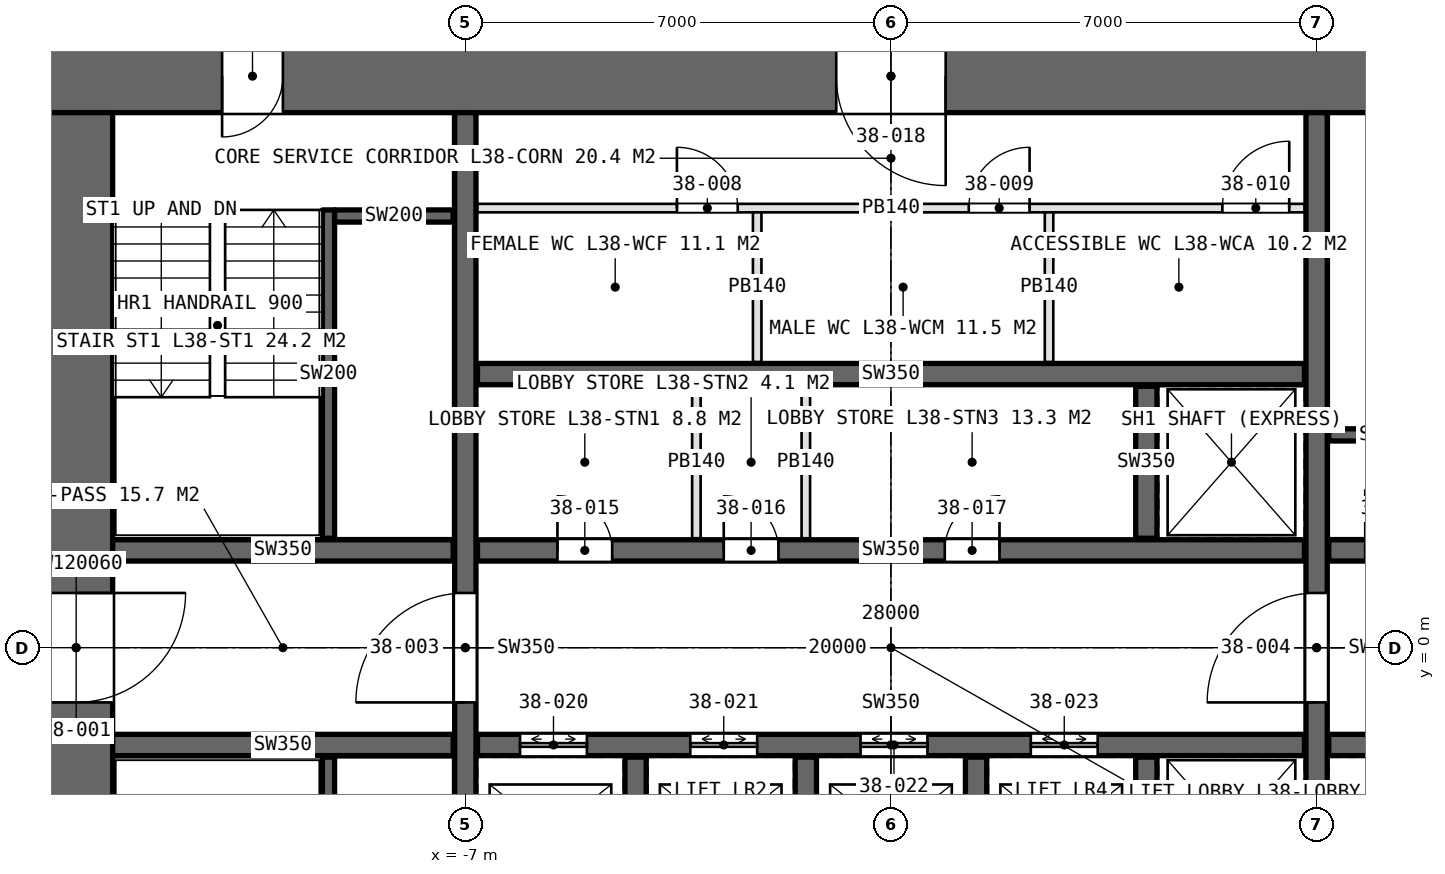
"""IFC4 building model, lengths in metres.
Left out: names, types, materials, properties, quantities, classifications, styles, units other than length and angle.
Written with IfcOpenShell. Run it as: python <this file> out.ifc"""

import sys

from ifc_helpers import new_model, si_unit, direction, frame, frame_2d, origin, place, context, subcontext, project, spatial, rectangle, extrude, element, fill, save


model = new_model("IFC4")
c1 = context("Model", 3, precision=1e-05, world=origin(), true_north=direction((0.0, 1.0)))
c2 = subcontext(c1, "Body", "Model", "MODEL_VIEW")
j1 = project(units=[si_unit("LENGTHUNIT", "METRE"), si_unit("PLANEANGLEUNIT", "RADIAN")], contexts=[c1])
p1 = place(None, origin())
s1 = spatial("IfcSite", under=j1, at=p1, CompositionType="ELEMENT")
p2 = place(p1, origin())
s2 = spatial("IfcBuilding", under=s1, at=p2, CompositionType="ELEMENT")
p3 = place(p2, frame((0.0, 0.0, 176.4)))
s3 = spatial("IfcBuildingStorey", under=s2, at=p3, CompositionType="ELEMENT", Elevation=176.4)
p4 = place(p3, frame((14.0, 9.4, 0.0), z_axis=(0.0, 0.0, 1.0), x_axis=(-1.0, 0.0, 0.0)))
e1 = element("IfcWall", 1, at=p4, inside=s3, PredefinedType="SHEAR", context=c2, shape_type="SweptSolid", body=[
    extrude(rectangle(XDim=28.0, YDim=1.2, at=frame_2d((14.0, 0.0))), origin(), (0.0, 0.0, 1.0), 4.2),
])
p5 = place(p4, frame((24.0, 0.0, 0.0)))
e2 = element("IfcOpeningElement", 2, at=p5, cuts=e1, PredefinedType="OPENING", context=c2, shape_type="SweptSolid", body=[
    extrude(rectangle(XDim=1.0, YDim=2.4, at=frame_2d((0.5, 1.2))), frame((0.0, 0.61, 0.0), z_axis=(0.0, -1.0, 0.0), x_axis=(1.0, 0.0, 0.0)), (0.0, 0.0, 1.0), 1.22),
])
p6 = place(p4, frame((13.1, 0.0, 0.0)))
e3 = element("IfcOpeningElement", 3, at=p6, cuts=e1, PredefinedType="OPENING", context=c2, shape_type="SweptSolid", body=[
    extrude(rectangle(XDim=1.8, YDim=2.4, at=frame_2d((0.9, 1.2))), frame((0.0, 0.61, 0.0), z_axis=(0.0, -1.0, 0.0), x_axis=(1.0, 0.0, 0.0)), (0.0, 0.0, 1.0), 1.22),
])
p7 = place(p3, frame((-13.4, 8.8, 0.0), z_axis=(0.0, 0.0, 1.0), x_axis=(0.0, -1.0, 0.0)))
e4 = element("IfcWall", 4, at=p7, inside=s3, PredefinedType="SHEAR", context=c2, shape_type="SweptSolid", body=[
    extrude(rectangle(XDim=17.6, YDim=1.2, at=frame_2d((8.8, 0.0))), origin(), (0.0, 0.0, 1.0), 4.2),
])
p8 = place(p7, frame((7.9, 0.0, 0.0)))
e5 = element("IfcOpeningElement", 5, at=p8, cuts=e4, PredefinedType="OPENING", context=c2, shape_type="SweptSolid", body=[
    extrude(rectangle(XDim=1.8, YDim=2.4, at=frame_2d((0.9, 1.2))), frame((0.0, 0.61, 0.0), z_axis=(0.0, -1.0, 0.0), x_axis=(1.0, 0.0, 0.0)), (0.0, 0.0, 1.0), 1.22),
])
p9 = place(p7, frame((16.5, 0.0, 0.0)))
e6 = element("IfcOpeningElement", 6, at=p9, cuts=e4, PredefinedType="OPENING", context=c2, shape_type="SweptSolid", body=[
    extrude(rectangle(XDim=1.0, YDim=2.4, at=frame_2d((0.5, 1.2))), frame((0.0, 0.61, 0.0), z_axis=(0.0, -1.0, 0.0), x_axis=(1.0, 0.0, 0.0)), (0.0, 0.0, 1.0), 1.22),
])
p10 = place(p3, frame((-7.0, -8.8, 0.0), z_axis=(0.0, 0.0, 1.0), x_axis=(0.0, 1.0, 0.0)))
e7 = element("IfcWall", 7, at=p10, inside=s3, PredefinedType="SHEAR", context=c2, shape_type="SweptSolid", body=[
    extrude(rectangle(XDim=17.6, YDim=0.35, at=frame_2d((8.8, 0.0))), origin(), (0.0, 0.0, 1.0), 4.2),
])
p11 = place(p10, frame((7.9, 0.0, 0.0)))
e8 = element("IfcOpeningElement", 8, at=p11, cuts=e7, PredefinedType="OPENING", context=c2, shape_type="SweptSolid", body=[
    extrude(rectangle(XDim=1.8, YDim=2.4, at=frame_2d((0.9, 1.2))), frame((0.0, 0.185, 0.0), z_axis=(0.0, -1.0, 0.0), x_axis=(1.0, 0.0, 0.0)), (0.0, 0.0, 1.0), 0.37),
])
p12 = place(p3, frame((7.0, -8.8, 0.0), z_axis=(0.0, 0.0, 1.0), x_axis=(0.0, 1.0, 0.0)))
e9 = element("IfcWall", 9, at=p12, inside=s3, PredefinedType="SHEAR", context=c2, shape_type="SweptSolid", body=[
    extrude(rectangle(XDim=17.6, YDim=0.35, at=frame_2d((8.8, 0.0))), origin(), (0.0, 0.0, 1.0), 4.2),
])
p13 = place(p12, frame((7.9, 0.0, 0.0)))
e10 = element("IfcOpeningElement", 10, at=p13, cuts=e9, PredefinedType="OPENING", context=c2, shape_type="SweptSolid", body=[
    extrude(rectangle(XDim=1.8, YDim=2.4, at=frame_2d((0.9, 1.2))), frame((0.0, 0.185, 0.0), z_axis=(0.0, -1.0, 0.0), x_axis=(1.0, 0.0, 0.0)), (0.0, 0.0, 1.0), 0.37),
])
p14 = place(p3, frame((-6.8, 1.6, 0.0), z_axis=(0.0, 0.0, 1.0), x_axis=(1.0, 0.0, 0.0)))
e11 = element("IfcWall", 11, at=p14, inside=s3, PredefinedType="SHEAR", context=c2, shape_type="SweptSolid", body=[
    extrude(rectangle(XDim=13.6, YDim=0.35, at=frame_2d((6.8, 0.0))), origin(), (0.0, 0.0, 1.0), 4.2),
])
p15 = place(p14, frame((1.315, 0.0, 0.0)))
e12 = element("IfcOpeningElement", 12, at=p15, cuts=e11, PredefinedType="OPENING", context=c2, shape_type="SweptSolid", body=[
    extrude(rectangle(XDim=0.9, YDim=2.4, at=frame_2d((0.45, 1.2))), frame((0.0, 0.185, 0.0), z_axis=(0.0, -1.0, 0.0), x_axis=(1.0, 0.0, 0.0)), (0.0, 0.0, 1.0), 0.37),
])
p16 = place(p14, frame((4.05, 0.0, 0.0)))
e13 = element("IfcOpeningElement", 13, at=p16, cuts=e11, PredefinedType="OPENING", context=c2, shape_type="SweptSolid", body=[
    extrude(rectangle(XDim=0.9, YDim=2.4, at=frame_2d((0.45, 1.2))), frame((0.0, 0.185, 0.0), z_axis=(0.0, -1.0, 0.0), x_axis=(1.0, 0.0, 0.0)), (0.0, 0.0, 1.0), 0.37),
])
p17 = place(p14, frame((7.685, 0.0, 0.0)))
e14 = element("IfcOpeningElement", 14, at=p17, cuts=e11, PredefinedType="OPENING", context=c2, shape_type="SweptSolid", body=[
    extrude(rectangle(XDim=0.9, YDim=2.4, at=frame_2d((0.45, 1.2))), frame((0.0, 0.185, 0.0), z_axis=(0.0, -1.0, 0.0), x_axis=(1.0, 0.0, 0.0)), (0.0, 0.0, 1.0), 0.37),
])
p18 = place(p3, frame((-6.8, -1.6, 0.0), z_axis=(0.0, 0.0, 1.0), x_axis=(1.0, 0.0, 0.0)))
e15 = element("IfcWall", 15, at=p18, inside=s3, PredefinedType="SHEAR", context=c2, shape_type="SweptSolid", body=[
    extrude(rectangle(XDim=13.6, YDim=0.35, at=frame_2d((6.8, 0.0))), origin(), (0.0, 0.0, 1.0), 4.2),
])
p19 = place(p18, frame((0.7, 0.0, 0.0)))
e16 = element("IfcOpeningElement", 16, at=p19, cuts=e15, PredefinedType="OPENING", context=c2, shape_type="SweptSolid", body=[
    extrude(rectangle(XDim=1.1, YDim=2.4, at=frame_2d((0.55, 1.2))), frame((0.0, 0.185, 0.0), z_axis=(0.0, -1.0, 0.0), x_axis=(1.0, 0.0, 0.0)), (0.0, 0.0, 1.0), 0.37),
])
p20 = place(p18, frame((3.5, 0.0, 0.0)))
e17 = element("IfcOpeningElement", 17, at=p20, cuts=e15, PredefinedType="OPENING", context=c2, shape_type="SweptSolid", body=[
    extrude(rectangle(XDim=1.1, YDim=2.4, at=frame_2d((0.55, 1.2))), frame((0.0, 0.185, 0.0), z_axis=(0.0, -1.0, 0.0), x_axis=(1.0, 0.0, 0.0)), (0.0, 0.0, 1.0), 0.37),
])
p21 = place(p18, frame((6.3, 0.0, 0.0)))
e18 = element("IfcOpeningElement", 18, at=p21, cuts=e15, PredefinedType="OPENING", context=c2, shape_type="SweptSolid", body=[
    extrude(rectangle(XDim=1.1, YDim=2.4, at=frame_2d((0.55, 1.2))), frame((0.0, 0.185, 0.0), z_axis=(0.0, -1.0, 0.0), x_axis=(1.0, 0.0, 0.0)), (0.0, 0.0, 1.0), 0.37),
])
p22 = place(p18, frame((9.1, 0.0, 0.0)))
e19 = element("IfcOpeningElement", 19, at=p22, cuts=e15, PredefinedType="OPENING", context=c2, shape_type="SweptSolid", body=[
    extrude(rectangle(XDim=1.1, YDim=2.4, at=frame_2d((0.55, 1.2))), frame((0.0, 0.185, 0.0), z_axis=(0.0, -1.0, 0.0), x_axis=(1.0, 0.0, 0.0)), (0.0, 0.0, 1.0), 0.37),
])
p23 = place(p3, frame((-6.8, 4.5, 0.0), z_axis=(0.0, 0.0, 1.0), x_axis=(1.0, 0.0, 0.0)))
e20 = element("IfcWall", 20, at=p23, inside=s3, PredefinedType="SHEAR", context=c2, shape_type="SweptSolid", body=[
    extrude(rectangle(XDim=13.6, YDim=0.35, at=frame_2d((6.8, 0.0))), origin(), (0.0, 0.0, 1.0), 4.2),
])
for number, where, z_axis, x_axis in (
    (21, (-12.8, 1.6, 0.0), (0.0, 0.0, 1.0), (1.0, 0.0, 0.0)),
    (22, (-12.8, -1.6, 0.0), (0.0, 0.0, 1.0), (1.0, 0.0, 0.0)),
):
    element("IfcWall", number, at=place(p3, frame(where, z_axis=z_axis, x_axis=x_axis)), inside=s3, PredefinedType="SHEAR", context=c2, shape_type="SweptSolid", body=[
        extrude(rectangle(XDim=5.6, YDim=0.35, at=frame_2d((2.8, 0.0))), origin(), (0.0, 0.0, 1.0), 4.2),
    ])
p24 = place(p3, frame((7.2, 1.6, 0.0), z_axis=(0.0, 0.0, 1.0), x_axis=(1.0, 0.0, 0.0)))
e23 = element("IfcWall", 23, at=p24, inside=s3, PredefinedType="SHEAR", context=c2, shape_type="SweptSolid", body=[
    extrude(rectangle(XDim=5.6, YDim=0.35, at=frame_2d((2.8, 0.0))), origin(), (0.0, 0.0, 1.0), 4.2),
])
p25 = place(p24, frame((0.6, 0.0, 0.0)))
e24 = element("IfcOpeningElement", 24, at=p25, cuts=e23, PredefinedType="OPENING", context=c2, shape_type="SweptSolid", body=[
    extrude(rectangle(XDim=1.0, YDim=2.4, at=frame_2d((0.5, 1.2))), frame((0.0, 0.185, 0.0), z_axis=(0.0, -1.0, 0.0), x_axis=(1.0, 0.0, 0.0)), (0.0, 0.0, 1.0), 0.37),
])
p26 = place(p3, frame((7.2, -1.6, 0.0), z_axis=(0.0, 0.0, 1.0), x_axis=(1.0, 0.0, 0.0)))
e25 = element("IfcWall", 25, at=p26, inside=s3, PredefinedType="SHEAR", context=c2, shape_type="SweptSolid", body=[
    extrude(rectangle(XDim=5.6, YDim=0.35, at=frame_2d((2.8, 0.0))), origin(), (0.0, 0.0, 1.0), 4.2),
])
p27 = place(p26, frame((0.9, 0.0, 0.0)))
e26 = element("IfcOpeningElement", 26, at=p27, cuts=e25, PredefinedType="OPENING", context=c2, shape_type="SweptSolid", body=[
    extrude(rectangle(XDim=1.3, YDim=2.4, at=frame_2d((0.65, 1.2))), frame((0.0, 0.185, 0.0), z_axis=(0.0, -1.0, 0.0), x_axis=(1.0, 0.0, 0.0)), (0.0, 0.0, 1.0), 0.37),
])
p28 = place(p26, frame((3.9, 0.0, 0.0)))
e27 = element("IfcOpeningElement", 27, at=p28, cuts=e25, PredefinedType="OPENING", context=c2, shape_type="SweptSolid", body=[
    extrude(rectangle(XDim=1.3, YDim=2.4, at=frame_2d((0.65, 1.2))), frame((0.0, 0.185, 0.0), z_axis=(0.0, -1.0, 0.0), x_axis=(1.0, 0.0, 0.0)), (0.0, 0.0, 1.0), 0.37),
])
for number, where, z_axis, x_axis in (
    (28, (-4.2, -4.3, 0.0), (0.0, 0.0, 1.0), (0.0, 1.0, 0.0)),
    (29, (-1.4, -4.3, 0.0), (0.0, 0.0, 1.0), (0.0, 1.0, 0.0)),
    (30, (1.4, -4.3, 0.0), (0.0, 0.0, 1.0), (0.0, 1.0, 0.0)),
    (31, (4.2, 1.8, 0.0), (0.0, 0.0, 1.0), (0.0, 1.0, 0.0)),
    (32, (4.2, -4.3, 0.0), (0.0, 0.0, 1.0), (0.0, 1.0, 0.0)),
):
    element("IfcWall", number, at=place(p3, frame(where, z_axis=z_axis, x_axis=x_axis)), inside=s3, PredefinedType="SHEAR", context=c2, shape_type="SweptSolid", body=[
        extrude(rectangle(XDim=2.5, YDim=0.35, at=frame_2d((1.25, 0.0))), origin(), (0.0, 0.0, 1.0), 4.2),
    ])
p29 = place(p3, frame((-6.8, 7.23, 0.0), z_axis=(0.0, 0.0, 1.0), x_axis=(1.0, 0.0, 0.0)))
e33 = element("IfcWall", 33, at=p29, inside=s3, PredefinedType="PARTITIONING", context=c2, shape_type="SweptSolid", body=[
    extrude(rectangle(XDim=13.6, YDim=0.14, at=frame_2d((6.8, 0.0))), origin(), (0.0, 0.0, 1.0), 3.95),
])
p30 = place(p29, frame((3.28, 0.0, 0.0)))
e34 = element("IfcOpeningElement", 34, at=p30, cuts=e33, PredefinedType="OPENING", context=c2, shape_type="SweptSolid", body=[
    extrude(rectangle(XDim=1.0, YDim=2.4, at=frame_2d((0.5, 1.2))), frame((0.0, 0.08, 0.0), z_axis=(0.0, -1.0, 0.0), x_axis=(1.0, 0.0, 0.0)), (0.0, 0.0, 1.0), 0.16),
])
p31 = place(p29, frame((8.08, 0.0, 0.0)))
e35 = element("IfcOpeningElement", 35, at=p31, cuts=e33, PredefinedType="OPENING", context=c2, shape_type="SweptSolid", body=[
    extrude(rectangle(XDim=1.0, YDim=2.4, at=frame_2d((0.5, 1.2))), frame((0.0, 0.08, 0.0), z_axis=(0.0, -1.0, 0.0), x_axis=(1.0, 0.0, 0.0)), (0.0, 0.0, 1.0), 0.16),
])
p32 = place(p29, frame((12.25, 0.0, 0.0)))
e36 = element("IfcOpeningElement", 36, at=p32, cuts=e33, PredefinedType="OPENING", context=c2, shape_type="SweptSolid", body=[
    extrude(rectangle(XDim=1.1, YDim=2.4, at=frame_2d((0.55, 1.2))), frame((0.0, 0.08, 0.0), z_axis=(0.0, -1.0, 0.0), x_axis=(1.0, 0.0, 0.0)), (0.0, 0.0, 1.0), 0.16),
])
for number, where, z_axis, x_axis in (
    (37, (-2.2, 4.7, 0.0), (0.0, 0.0, 1.0), (0.0, 1.0, 0.0)),
    (38, (2.6, 4.7, 0.0), (0.0, 0.0, 1.0), (0.0, 1.0, 0.0)),
):
    element("IfcWall", number, at=place(p3, frame(where, z_axis=z_axis, x_axis=x_axis)), inside=s3, PredefinedType="PARTITIONING", context=c2, shape_type="SweptSolid", body=[
        extrude(rectangle(XDim=2.46, YDim=0.14, at=frame_2d((1.23, 0.0))), origin(), (0.0, 0.0, 1.0), 3.95),
    ])
for number, where, z_axis, x_axis in (
    (39, (-3.2, 1.8, 0.0), (0.0, 0.0, 1.0), (0.0, 1.0, 0.0)),
    (40, (-1.4, 1.8, 0.0), (0.0, 0.0, 1.0), (0.0, 1.0, 0.0)),
):
    element("IfcWall", number, at=place(p3, frame(where, z_axis=z_axis, x_axis=x_axis)), inside=s3, PredefinedType="PARTITIONING", context=c2, shape_type="SweptSolid", body=[
        extrude(rectangle(XDim=2.5, YDim=0.14, at=frame_2d((1.25, 0.0))), origin(), (0.0, 0.0, 1.0), 3.95),
    ])
p33 = place(p3, frame((-9.25, 7.2, 0.0), z_axis=(0.0, 0.0, 1.0), x_axis=(0.0, -1.0, 0.0)))
e41 = element("IfcWall", 41, at=p33, inside=s3, PredefinedType="SOLIDWALL", context=c2, shape_type="SweptSolid", body=[
    extrude(rectangle(XDim=5.4, YDim=0.2, at=frame_2d((2.7, 0.0))), origin(), (0.0, 0.0, 1.0), 4.2),
])
p34 = place(p3, frame((-9.15, 7.1, 0.0), z_axis=(0.0, 0.0, 1.0), x_axis=(1.0, 0.0, 0.0)))
e42 = element("IfcWall", 42, at=p34, inside=s3, PredefinedType="SOLIDWALL", context=c2, shape_type="SweptSolid", body=[
    extrude(rectangle(XDim=1.95, YDim=0.2, at=frame_2d((0.975, 0.0))), origin(), (0.0, 0.0, 1.0), 4.2),
])
p35 = place(p3, frame((-9.25, -7.2, 0.0), z_axis=(0.0, 0.0, 1.0), x_axis=(0.0, 1.0, 0.0)))
e43 = element("IfcWall", 43, at=p35, inside=s3, PredefinedType="SOLIDWALL", context=c2, shape_type="SweptSolid", body=[
    extrude(rectangle(XDim=5.4, YDim=0.2, at=frame_2d((2.7, 0.0))), origin(), (0.0, 0.0, 1.0), 4.2),
])
p36 = place(p3, frame((9.15, 3.5, 0.0), z_axis=(0.0, 0.0, 1.0), x_axis=(-1.0, 0.0, 0.0)))
e44 = element("IfcWall", 44, at=p36, inside=s3, PredefinedType="SOLIDWALL", context=c2, shape_type="SweptSolid", body=[
    extrude(rectangle(XDim=1.95, YDim=0.2, at=frame_2d((0.975, 0.0))), origin(), (0.0, 0.0, 1.0), 4.2),
])
p37 = place(p8, origin())
e45 = element("IfcDoor", 45, at=p37, inside=s3, OperationType="DOUBLE_DOOR_SINGLE_SWING", PredefinedType="DOOR", context=c2, shape_type="SweptSolid", body=[
    extrude(rectangle(XDim=1.8, YDim=2.4, at=frame_2d((0.9, 1.2))), frame((0.0, 0.025, 0.0), z_axis=(0.0, -1.0, 0.0), x_axis=(1.0, 0.0, 0.0)), (0.0, 0.0, 1.0), 0.05),
])
fill(e5, e45)
p38 = place(p11, origin())
e46 = element("IfcDoor", 46, at=p38, inside=s3, OperationType="DOUBLE_DOOR_SINGLE_SWING", PredefinedType="DOOR", context=c2, shape_type="SweptSolid", body=[
    extrude(rectangle(XDim=1.8, YDim=2.4, at=frame_2d((0.9, 1.2))), frame((0.0, 0.025, 0.0), z_axis=(0.0, -1.0, 0.0), x_axis=(1.0, 0.0, 0.0)), (0.0, 0.0, 1.0), 0.05),
])
fill(e8, e46)
p39 = place(p13, origin())
e47 = element("IfcDoor", 47, at=p39, inside=s3, OperationType="DOUBLE_DOOR_SINGLE_SWING", PredefinedType="DOOR", context=c2, shape_type="SweptSolid", body=[
    extrude(rectangle(XDim=1.8, YDim=2.4, at=frame_2d((0.9, 1.2))), frame((0.0, 0.025, 0.0), z_axis=(0.0, -1.0, 0.0), x_axis=(1.0, 0.0, 0.0)), (0.0, 0.0, 1.0), 0.05),
])
fill(e10, e47)
p40 = place(p5, origin())
e48 = element("IfcDoor", 48, at=p40, inside=s3, OperationType="SINGLE_SWING_RIGHT", PredefinedType="DOOR", context=c2, shape_type="SweptSolid", body=[
    extrude(rectangle(XDim=1.0, YDim=2.4, at=frame_2d((0.5, 1.2))), frame((0.0, 0.025, 0.0), z_axis=(0.0, -1.0, 0.0), x_axis=(1.0, 0.0, 0.0)), (0.0, 0.0, 1.0), 0.05),
])
fill(e2, e48)
p41 = place(p30, origin())
e49 = element("IfcDoor", 49, at=p41, inside=s3, OperationType="SINGLE_SWING_LEFT", PredefinedType="DOOR", context=c2, shape_type="SweptSolid", body=[
    extrude(rectangle(XDim=1.0, YDim=2.4, at=frame_2d((0.5, 1.2))), frame((0.0, 0.025, 0.0), z_axis=(0.0, -1.0, 0.0), x_axis=(1.0, 0.0, 0.0)), (0.0, 0.0, 1.0), 0.05),
])
fill(e34, e49)
p42 = place(p31, origin())
e50 = element("IfcDoor", 50, at=p42, inside=s3, OperationType="SINGLE_SWING_RIGHT", PredefinedType="DOOR", context=c2, shape_type="SweptSolid", body=[
    extrude(rectangle(XDim=1.0, YDim=2.4, at=frame_2d((0.5, 1.2))), frame((0.0, 0.025, 0.0), z_axis=(0.0, -1.0, 0.0), x_axis=(1.0, 0.0, 0.0)), (0.0, 0.0, 1.0), 0.05),
])
fill(e35, e50)
p43 = place(p32, origin())
e51 = element("IfcDoor", 51, at=p43, inside=s3, OperationType="SINGLE_SWING_RIGHT", PredefinedType="DOOR", context=c2, shape_type="SweptSolid", body=[
    extrude(rectangle(XDim=1.1, YDim=2.4, at=frame_2d((0.55, 1.2))), frame((0.0, 0.025, 0.0), z_axis=(0.0, -1.0, 0.0), x_axis=(1.0, 0.0, 0.0)), (0.0, 0.0, 1.0), 0.05),
])
fill(e36, e51)
p44 = place(p15, origin())
e52 = element("IfcDoor", 52, at=p44, inside=s3, OperationType="SINGLE_SWING_LEFT", PredefinedType="DOOR", context=c2, shape_type="SweptSolid", body=[
    extrude(rectangle(XDim=0.9, YDim=2.4, at=frame_2d((0.45, 1.2))), frame((0.0, 0.025, 0.0), z_axis=(0.0, -1.0, 0.0), x_axis=(1.0, 0.0, 0.0)), (0.0, 0.0, 1.0), 0.05),
])
fill(e12, e52)
p45 = place(p16, origin())
e53 = element("IfcDoor", 53, at=p45, inside=s3, OperationType="SINGLE_SWING_LEFT", PredefinedType="DOOR", context=c2, shape_type="SweptSolid", body=[
    extrude(rectangle(XDim=0.9, YDim=2.4, at=frame_2d((0.45, 1.2))), frame((0.0, 0.025, 0.0), z_axis=(0.0, -1.0, 0.0), x_axis=(1.0, 0.0, 0.0)), (0.0, 0.0, 1.0), 0.05),
])
fill(e13, e53)
p46 = place(p17, origin())
e54 = element("IfcDoor", 54, at=p46, inside=s3, OperationType="SINGLE_SWING_RIGHT", PredefinedType="DOOR", context=c2, shape_type="SweptSolid", body=[
    extrude(rectangle(XDim=0.9, YDim=2.4, at=frame_2d((0.45, 1.2))), frame((0.0, 0.025, 0.0), z_axis=(0.0, -1.0, 0.0), x_axis=(1.0, 0.0, 0.0)), (0.0, 0.0, 1.0), 0.05),
])
fill(e14, e54)
p47 = place(p6, origin())
e55 = element("IfcDoor", 55, at=p47, inside=s3, OperationType="DOUBLE_DOOR_SINGLE_SWING", PredefinedType="DOOR", context=c2, shape_type="SweptSolid", body=[
    extrude(rectangle(XDim=1.8, YDim=2.4, at=frame_2d((0.9, 1.2))), frame((0.0, 0.025, 0.0), z_axis=(0.0, -1.0, 0.0), x_axis=(1.0, 0.0, 0.0)), (0.0, 0.0, 1.0), 0.05),
])
fill(e3, e55)
p48 = place(p19, origin())
e56 = element("IfcDoor", 56, at=p48, inside=s3, OperationType="DOUBLE_DOOR_SLIDING", PredefinedType="DOOR", context=c2, shape_type="SweptSolid", body=[
    extrude(rectangle(XDim=1.1, YDim=2.4, at=frame_2d((0.55, 1.2))), frame((0.0, 0.025, 0.0), z_axis=(0.0, -1.0, 0.0), x_axis=(1.0, 0.0, 0.0)), (0.0, 0.0, 1.0), 0.05),
])
fill(e16, e56)
p49 = place(p20, origin())
e57 = element("IfcDoor", 57, at=p49, inside=s3, OperationType="DOUBLE_DOOR_SLIDING", PredefinedType="DOOR", context=c2, shape_type="SweptSolid", body=[
    extrude(rectangle(XDim=1.1, YDim=2.4, at=frame_2d((0.55, 1.2))), frame((0.0, 0.025, 0.0), z_axis=(0.0, -1.0, 0.0), x_axis=(1.0, 0.0, 0.0)), (0.0, 0.0, 1.0), 0.05),
])
fill(e17, e57)
p50 = place(p21, origin())
e58 = element("IfcDoor", 58, at=p50, inside=s3, OperationType="DOUBLE_DOOR_SLIDING", PredefinedType="DOOR", context=c2, shape_type="SweptSolid", body=[
    extrude(rectangle(XDim=1.1, YDim=2.4, at=frame_2d((0.55, 1.2))), frame((0.0, 0.025, 0.0), z_axis=(0.0, -1.0, 0.0), x_axis=(1.0, 0.0, 0.0)), (0.0, 0.0, 1.0), 0.05),
])
fill(e18, e58)
p51 = place(p22, origin())
e59 = element("IfcDoor", 59, at=p51, inside=s3, OperationType="DOUBLE_DOOR_SLIDING", PredefinedType="DOOR", context=c2, shape_type="SweptSolid", body=[
    extrude(rectangle(XDim=1.1, YDim=2.4, at=frame_2d((0.55, 1.2))), frame((0.0, 0.025, 0.0), z_axis=(0.0, -1.0, 0.0), x_axis=(1.0, 0.0, 0.0)), (0.0, 0.0, 1.0), 0.05),
])
fill(e19, e59)
save(model, sys.argv[1])
